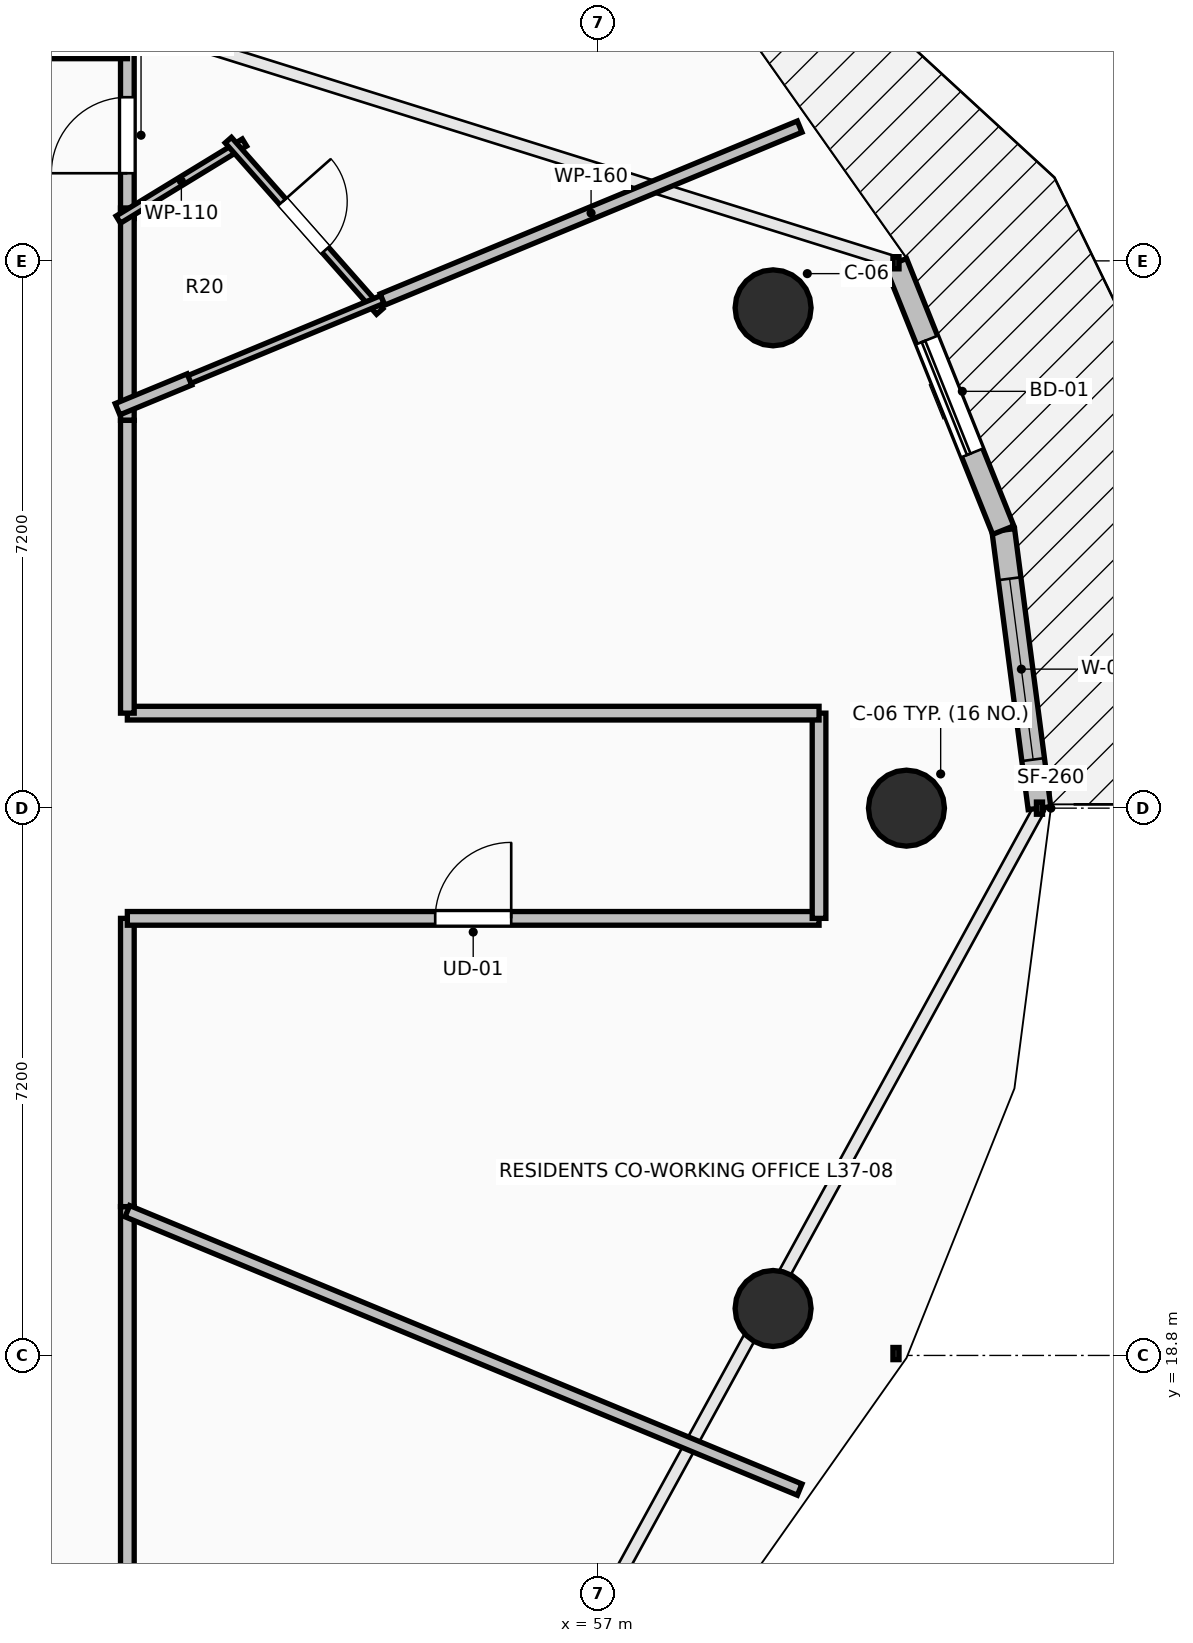
"""IFC4 building model, lengths in metres.
Left out: names, types, materials, properties, quantities, classifications, styles, units other than length and angle.
Written with IfcOpenShell. Run it as: python <this file> out.ifc"""

import sys

from ifc_helpers import new_model, si_unit, direction, frame, frame_2d, origin, origin_2d, place, context, subcontext, project, spatial, rectangle, circle, extrude, element, fill, save


model = new_model("IFC4")
c1 = context("Model", 3, precision=1e-05, world=origin(), true_north=direction((0.0, 1.0)))
c2 = subcontext(c1, "Body", "Model", "MODEL_VIEW")
j1 = project(units=[si_unit("LENGTHUNIT", "METRE"), si_unit("PLANEANGLEUNIT", "RADIAN")], contexts=[c1])
p1 = place(None, origin())
s1 = spatial("IfcSite", under=j1, at=p1, CompositionType="ELEMENT")
p2 = place(p1, origin())
s2 = spatial("IfcBuilding", under=s1, at=p2, CompositionType="ELEMENT")
p3 = place(p2, frame((0.0, 0.0, 139.6)))
s3 = spatial("IfcBuildingStorey", under=s2, at=p3, CompositionType="ELEMENT", Elevation=139.6)
for number, where, z_axis, x_axis in (
    (1, (61.05, 26.0, 0.0), (0.0, 0.0, 1.0), (1.0, 0.0, 0.0)),
    (2, (59.295, 32.582, 0.0), (0.0, 0.0, 1.0), (0.924, 0.383, 0.0)),
    (3, (59.295, 19.418, 0.0), (0.0, 0.0, 1.0), (0.924, -0.383, 0.0)),
):
    element("IfcColumn", number, at=place(p3, frame(where, z_axis=z_axis, x_axis=x_axis)), inside=s3, PredefinedType="COLUMN", context=c2, shape_type="SweptSolid", body=[
        extrude(circle(Radius=0.5, at=origin_2d()), origin(), (0.0, 0.0, 1.0), 3.5),
    ])
p4 = place(p3, frame((62.8, 26.0, 0.0), z_axis=(0.0, 0.0, 1.0), x_axis=(-0.129189225186, 0.991619959509, 0.0)))
e4 = element("IfcWall", 4, at=p4, inside=s3, PredefinedType="STANDARD", context=c2, shape_type="SweptSolid", body=[
    extrude(rectangle(XDim=3.689, YDim=0.3, at=frame_2d((1.844, 0.0))), origin(), (0.0, 0.0, 1.0), 3.24),
])
p5 = place(p4, frame((0.644, 0.0, 0.85)))
e5 = element("IfcOpeningElement", 5, at=p5, cuts=e4, PredefinedType="OPENING", context=c2, shape_type="SweptSolid", body=[
    extrude(rectangle(XDim=2.4, YDim=2.19, at=frame_2d((1.2, 1.095))), frame((0.0, 0.165, 0.0), z_axis=(0.0, -1.0, 0.0), x_axis=(1.0, 0.0, 0.0)), (0.0, 0.0, 1.0), 0.33),
])
p6 = place(p3, frame((62.323, 29.658, 0.0), z_axis=(0.0, 0.0, 1.0), x_axis=(-0.372401154411, 0.928071861546, 0.0)))
e6 = element("IfcWall", 6, at=p6, inside=s3, PredefinedType="STANDARD", context=c2, shape_type="SweptSolid", body=[
    extrude(rectangle(XDim=3.79, YDim=0.3, at=frame_2d((1.895, 0.0))), origin(), (0.0, 0.0, 1.0), 3.24),
])
p7 = place(p6, frame((1.095, 0.0, 0.0)))
e7 = element("IfcOpeningElement", 7, at=p7, cuts=e6, PredefinedType="OPENING", context=c2, shape_type="SweptSolid", body=[
    extrude(rectangle(XDim=1.6, YDim=2.3, at=frame_2d((0.8, 1.15))), frame((0.0, 0.165, 0.0), z_axis=(0.0, -1.0, 0.0), x_axis=(1.0, 0.0, 0.0)), (0.0, 0.0, 1.0), 0.33),
])
p8 = place(p3, frame((50.8, 33.756, 0.0), z_axis=(0.0, 0.0, 1.0), x_axis=(0.0, 1.0, 0.0)))
e8 = element("IfcWall", 8, at=p8, inside=s3, PredefinedType="PARTITIONING", context=c2, shape_type="SweptSolid", body=[
    extrude(rectangle(XDim=2.194, YDim=0.18, at=frame_2d((1.097, 0.0))), origin(), (0.0, 0.0, 1.0), 2.432),
])
p9 = place(p8, frame((0.597, 0.0, 0.0)))
e9 = element("IfcOpeningElement", 9, at=p9, cuts=e8, PredefinedType="OPENING", context=c2, shape_type="SweptSolid", body=[
    extrude(rectangle(XDim=1.0, YDim=2.15, at=frame_2d((0.5, 1.075))), frame((0.0, 0.105, 0.0), z_axis=(0.0, -1.0, 0.0), x_axis=(1.0, 0.0, 0.0)), (0.0, 0.0, 1.0), 0.21),
])
p10 = place(p3, frame((50.8, 35.95, 0.0), z_axis=(0.0, 0.0, 1.0), x_axis=(-1.0, 0.0, 0.0)))
e10 = element("IfcWall", 10, at=p10, inside=s3, PredefinedType="PARTITIONING", context=c2, shape_type="SweptSolid", body=[
    extrude(rectangle(XDim=2.096, YDim=0.18, at=frame_2d((1.048, 0.0))), origin(), (0.0, 0.0, 1.0), 2.972),
])
p11 = place(p3, frame((50.8, 31.102, 0.0), z_axis=(0.0, 0.0, 1.0), x_axis=(0.0, 1.0, 0.0)))
e11 = element("IfcWall", 11, at=p11, inside=s3, PredefinedType="PARTITIONING", context=c2, shape_type="SweptSolid", body=[
    extrude(rectangle(XDim=2.794, YDim=0.18, at=frame_2d((1.397, 0.0))), origin(), (0.0, 0.0, 1.0), 2.432),
])
p12 = place(p3, frame((50.8, 14.05, 0.0), z_axis=(0.0, 0.0, 1.0), x_axis=(0.0, 1.0, 0.0)))
e12 = element("IfcWall", 12, at=p12, inside=s3, PredefinedType="PARTITIONING", context=c2, shape_type="SweptSolid", body=[
    extrude(rectangle(XDim=6.708, YDim=0.18, at=frame_2d((3.354, 0.0))), origin(), (0.0, 0.0, 1.0), 2.432),
])
p13 = place(p3, frame((50.8, 20.758, 0.0), z_axis=(0.0, 0.0, 1.0), x_axis=(0.0, 1.0, 0.0)))
e13 = element("IfcWall", 13, at=p13, inside=s3, PredefinedType="PARTITIONING", context=c2, shape_type="SweptSolid", body=[
    extrude(rectangle(XDim=3.792, YDim=0.18, at=frame_2d((1.896, 0.0))), origin(), (0.0, 0.0, 1.0), 3.24),
])
p14 = place(p3, frame((50.8, 24.55, 0.0), z_axis=(0.0, 0.0, 1.0), x_axis=(1.0, 0.0, 0.0)))
e14 = element("IfcWall", 14, at=p14, inside=s3, PredefinedType="PARTITIONING", context=c2, shape_type="SweptSolid", body=[
    extrude(rectangle(XDim=9.1, YDim=0.18, at=frame_2d((4.55, 0.0))), origin(), (0.0, 0.0, 1.0), 2.432),
])
p15 = place(p14, frame((4.05, 0.0, 0.0)))
e15 = element("IfcOpeningElement", 15, at=p15, cuts=e14, PredefinedType="OPENING", context=c2, shape_type="SweptSolid", body=[
    extrude(rectangle(XDim=1.0, YDim=2.15, at=frame_2d((0.5, 1.075))), frame((0.0, 0.105, 0.0), z_axis=(0.0, -1.0, 0.0), x_axis=(1.0, 0.0, 0.0)), (0.0, 0.0, 1.0), 0.21),
])
p16 = place(p3, frame((59.9, 24.55, 0.0), z_axis=(0.0, 0.0, 1.0), x_axis=(0.0, 1.0, 0.0)))
e16 = element("IfcWall", 16, at=p16, inside=s3, PredefinedType="PARTITIONING", context=c2, shape_type="SweptSolid", body=[
    extrude(rectangle(XDim=2.7, YDim=0.18, at=frame_2d((1.35, 0.0))), origin(), (0.0, 0.0, 1.0), 2.432),
])
p17 = place(p3, frame((59.9, 27.25, 0.0), z_axis=(0.0, 0.0, 1.0), x_axis=(-1.0, 0.0, 0.0)))
e17 = element("IfcWall", 17, at=p17, inside=s3, PredefinedType="PARTITIONING", context=c2, shape_type="SweptSolid", body=[
    extrude(rectangle(XDim=9.1, YDim=0.18, at=frame_2d((4.55, 0.0))), origin(), (0.0, 0.0, 1.0), 2.432),
])
p18 = place(p3, frame((50.8, 27.25, 0.0), z_axis=(0.0, 0.0, 1.0), x_axis=(0.0, 1.0, 0.0)))
e18 = element("IfcWall", 18, at=p18, inside=s3, PredefinedType="PARTITIONING", context=c2, shape_type="SweptSolid", body=[
    extrude(rectangle(XDim=3.852, YDim=0.18, at=frame_2d((1.926, 0.0))), origin(), (0.0, 0.0, 1.0), 2.432),
])
p19 = place(p3, frame((50.68, 33.743, 0.0), z_axis=(0.0, 0.0, 1.0), x_axis=(0.853368681548, 0.52130786811, 0.0)))
e19 = element("IfcWall", 19, at=p19, inside=s3, PredefinedType="PARTITIONING", context=c2, shape_type="SweptSolid", body=[
    extrude(rectangle(XDim=1.945, YDim=0.11, at=frame_2d((0.973, 0.0))), origin(), (0.0, 0.0, 1.0), 2.972),
])
p20 = place(p3, frame((52.128, 34.789, 0.0), z_axis=(0.0, 0.0, 1.0), x_axis=(0.66196248337, -0.74953697081, 0.0)))
e20 = element("IfcWall", 20, at=p20, inside=s3, PredefinedType="PARTITIONING", context=c2, shape_type="SweptSolid", body=[
    extrude(rectangle(XDim=3.008, YDim=0.11, at=frame_2d((1.504, 0.0))), origin(), (0.0, 0.0, 1.0), 2.432),
])
p21 = place(p20, frame((1.079, 0.0, 0.0)))
e21 = element("IfcOpeningElement", 21, at=p21, cuts=e20, PredefinedType="OPENING", context=c2, shape_type="SweptSolid", body=[
    extrude(rectangle(XDim=0.85, YDim=2.1, at=frame_2d((0.425, 1.05))), frame((0.0, 0.07, 0.0), z_axis=(0.0, -1.0, 0.0), x_axis=(1.0, 0.0, 0.0)), (0.0, 0.0, 1.0), 0.14),
])
p22 = place(p3, frame((54.156, 32.693, 0.0), z_axis=(0.0, 0.0, 1.0), x_axis=(-0.923770555063, -0.382946421316, 0.0)))
e22 = element("IfcWall", 22, at=p22, inside=s3, PredefinedType="PARTITIONING", context=c2, shape_type="SweptSolid", body=[
    extrude(rectangle(XDim=2.889, YDim=0.11, at=frame_2d((1.444, 0.0))), origin(), (0.0, 0.0, 1.0), 2.432),
])
p23 = place(p3, frame((51.874, 38.824, 0.0), z_axis=(0.0, 0.0, 1.0), x_axis=(-0.734347971597, -0.678773199685, 0.0)))
e23 = element("IfcWall", 23, at=p23, inside=s3, PredefinedType="PARTITIONING", context=c2, shape_type="SweptSolid", body=[
    extrude(rectangle(XDim=4.235, YDim=0.125, at=frame_2d((2.117, 0.0))), origin(), (0.0, 0.0, 1.0), 2.922),
])
p24 = place(p23, frame((1.667, 0.0, 0.0)))
e24 = element("IfcOpeningElement", 24, at=p24, cuts=e23, PredefinedType="OPENING", context=c2, shape_type="SweptSolid", body=[
    extrude(rectangle(XDim=0.9, YDim=2.1, at=frame_2d((0.45, 1.05))), frame((0.0, 0.077, 0.0), z_axis=(0.0, -1.0, 0.0), x_axis=(1.0, 0.0, 0.0)), (0.0, 0.0, 1.0), 0.155),
])
p25 = place(p3, frame((54.156, 32.692, 0.0), z_axis=(0.0, 0.0, 1.0), x_axis=(0.923849528339, 0.382755860814, 0.0)))
e25 = element("IfcWall", 25, at=p25, inside=s3, PredefinedType="PARTITIONING", context=c2, shape_type="SweptSolid", body=[
    extrude(rectangle(XDim=5.941, YDim=0.16, at=frame_2d((2.97, 0.0))), origin(), (0.0, 0.0, 1.0), 2.432),
])
p26 = place(p3, frame((50.671, 31.249, 0.0), z_axis=(0.0, 0.0, 1.0), x_axis=(0.924089428906, 0.38217630406, 0.0)))
e26 = element("IfcWall", 26, at=p26, inside=s3, PredefinedType="PARTITIONING", context=c2, shape_type="SweptSolid", body=[
    extrude(rectangle(XDim=1.024, YDim=0.16, at=frame_2d((0.512, 0.0))), origin(), (0.0, 0.0, 1.0), 3.24),
])
p27 = place(p3, frame((50.908, 41.94, 0.0), z_axis=(0.0, 0.0, 1.0), x_axis=(-0.62935766896, -0.77711577292, 0.0)))
e27 = element("IfcWall", 27, at=p27, inside=s3, PredefinedType="PARTITIONING", context=c2, shape_type="SweptSolid", body=[
    extrude(rectangle(XDim=7.708, YDim=0.125, at=frame_2d((3.854, 0.0))), origin(), (0.0, 0.0, 1.0), 2.432),
])
p28 = place(p3, frame((59.645, 17.035, 0.0), z_axis=(0.0, 0.0, 1.0), x_axis=(-0.923902460479, 0.382628074665, 0.0)))
e28 = element("IfcWall", 28, at=p28, inside=s3, PredefinedType="PARTITIONING", context=c2, shape_type="SweptSolid", body=[
    extrude(rectangle(XDim=9.573, YDim=0.16, at=frame_2d((4.787, 0.0))), origin(), (0.0, 0.0, 1.0), 2.728),
])
p29 = place(p7, origin())
e29 = element("IfcDoor", 29, at=p29, inside=s3, OperationType="SLIDING_TO_LEFT", PredefinedType="DOOR", context=c2, shape_type="SweptSolid", body=[
    extrude(rectangle(XDim=1.6, YDim=2.3, at=frame_2d((0.8, 1.15))), frame((0.0, 0.025, 0.0), z_axis=(0.0, -1.0, 0.0), x_axis=(1.0, 0.0, 0.0)), (0.0, 0.0, 1.0), 0.05),
])
fill(e7, e29)
p30 = place(p5, origin())
e30 = element("IfcWindow", 30, at=p30, inside=s3, PartitioningType="SINGLE_PANEL", PredefinedType="WINDOW", context=c2, shape_type="SweptSolid", body=[
    extrude(rectangle(XDim=2.4, YDim=2.19, at=frame_2d((1.2, 1.095))), frame((0.0, 0.03, 0.0), z_axis=(0.0, -1.0, 0.0), x_axis=(1.0, 0.0, 0.0)), (0.0, 0.0, 1.0), 0.06),
])
fill(e5, e30)
p31 = place(p9, origin())
e31 = element("IfcDoor", 31, at=p31, inside=s3, OperationType="SINGLE_SWING_LEFT", PredefinedType="DOOR", context=c2, shape_type="SweptSolid", body=[
    extrude(rectangle(XDim=1.0, YDim=2.15, at=frame_2d((0.5, 1.075))), frame((0.0, 0.025, 0.0), z_axis=(0.0, -1.0, 0.0), x_axis=(1.0, 0.0, 0.0)), (0.0, 0.0, 1.0), 0.05),
])
fill(e9, e31)
p32 = place(p15, origin())
e32 = element("IfcDoor", 32, at=p32, inside=s3, OperationType="SINGLE_SWING_RIGHT", PredefinedType="DOOR", context=c2, shape_type="SweptSolid", body=[
    extrude(rectangle(XDim=1.0, YDim=2.15, at=frame_2d((0.5, 1.075))), frame((0.0, 0.025, 0.0), z_axis=(0.0, -1.0, 0.0), x_axis=(1.0, 0.0, 0.0)), (0.0, 0.0, 1.0), 0.05),
])
fill(e15, e32)
p33 = place(p21, origin())
e33 = element("IfcDoor", 33, at=p33, inside=s3, OperationType="SINGLE_SWING_LEFT", PredefinedType="DOOR", context=c2, shape_type="SweptSolid", body=[
    extrude(rectangle(XDim=0.85, YDim=2.1, at=frame_2d((0.425, 1.05))), frame((0.0, 0.025, 0.0), z_axis=(0.0, -1.0, 0.0), x_axis=(1.0, 0.0, 0.0)), (0.0, 0.0, 1.0), 0.05),
])
fill(e21, e33)
save(model, sys.argv[1])
